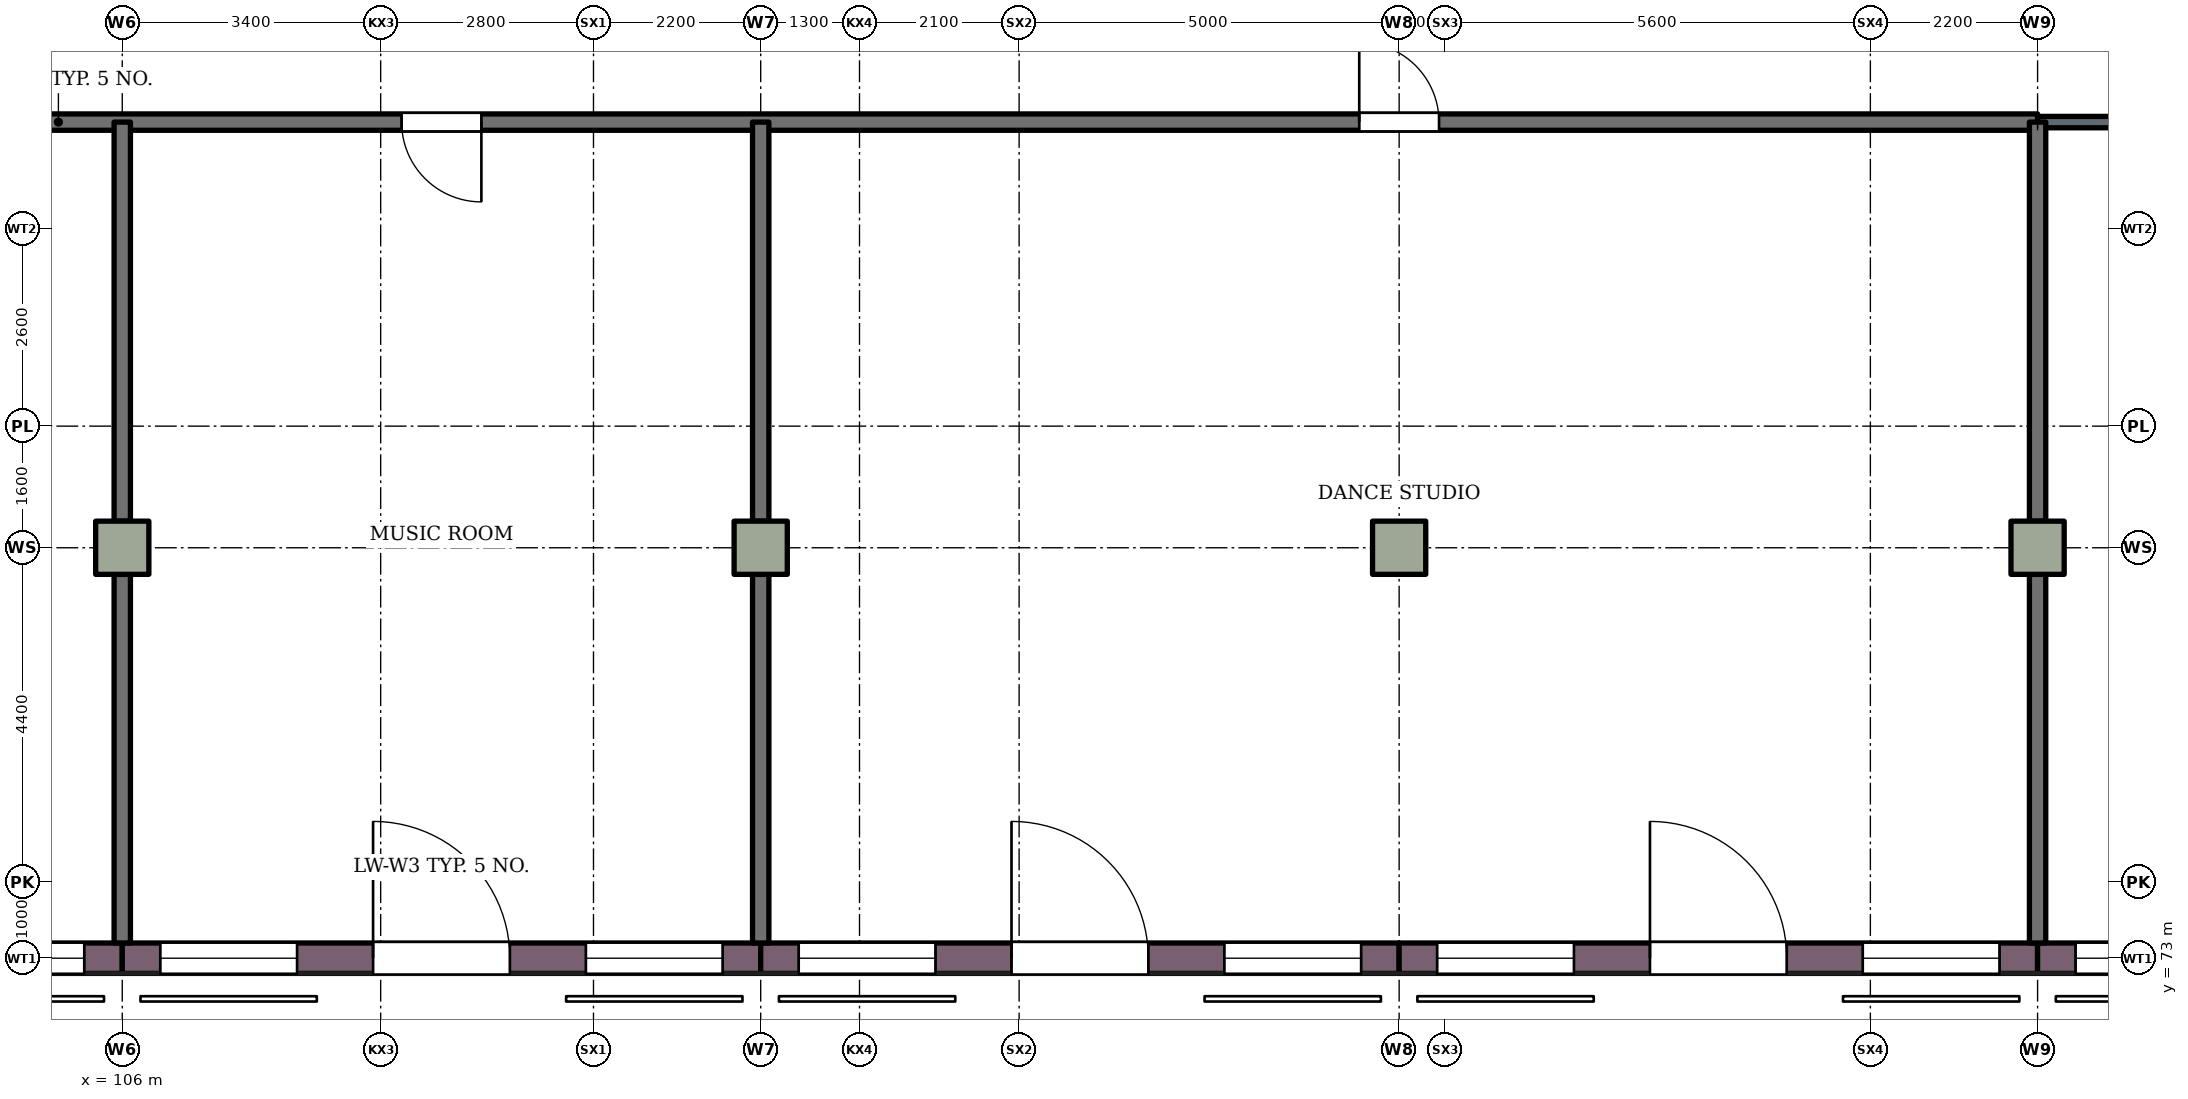
"""IFC4 building model, lengths in metres.
Left out: names, types, materials, properties, quantities, classifications, styles, units other than length and angle.
Written with IfcOpenShell. Run it as: python <this file> out.ifc"""

import sys

from ifc_helpers import new_model, si_unit, direction, frame, frame_2d, origin, origin_2d, place, context, subcontext, project, spatial, rectangle, extrude, element, fill, save


model = new_model("IFC4")
c1 = context("Model", 3, precision=1e-05, world=origin(), true_north=direction((0.0, 1.0)))
c2 = subcontext(c1, "Body", "Model", "MODEL_VIEW")
j1 = project(units=[si_unit("LENGTHUNIT", "METRE"), si_unit("PLANEANGLEUNIT", "RADIAN")], contexts=[c1])
p1 = place(None, origin())
s1 = spatial("IfcSite", under=j1, at=p1, CompositionType="ELEMENT")
p2 = place(p1, origin())
s2 = spatial("IfcBuilding", under=s1, at=p2, CompositionType="ELEMENT")
p3 = place(p2, frame((0.0, 0.0, 4.2)))
s3 = spatial("IfcBuildingStorey", under=s2, at=p3, CompositionType="ELEMENT", Elevation=4.2)
for number, where, z_axis, x_axis in (
    (1, (106.0, 78.4, 0.0), (0.0, 0.0, 1.0), (1.0, 0.0, 0.0)),
    (2, (114.4, 78.4, 0.0), (0.0, 0.0, 1.0), (1.0, 0.0, 0.0)),
    (3, (122.8, 78.4, 0.0), (0.0, 0.0, 1.0), (1.0, 0.0, 0.0)),
    (4, (131.2, 78.4, 0.0), (0.0, 0.0, 1.0), (1.0, 0.0, 0.0)),
):
    element("IfcColumn", number, at=place(p3, frame(where, z_axis=z_axis, x_axis=x_axis)), inside=s3, PredefinedType="COLUMN", context=c2, shape_type="SweptSolid", body=[
        extrude(rectangle(XDim=0.7, YDim=0.7, at=origin_2d()), origin(), (0.0, 0.0, 1.0), 4.2),
    ])
p4 = place(p3, frame((97.6, 73.0, 0.0), z_axis=(0.0, 0.0, 1.0), x_axis=(1.0, 0.0, 0.0)))
e5 = element("IfcWall", 5, at=p4, inside=s3, PredefinedType="SOLIDWALL", context=c2, shape_type="SweptSolid", body=[
    extrude(rectangle(XDim=8.4, YDim=0.4, at=frame_2d((4.2, 0.0))), origin(), (0.0, 0.0, 1.0), 3.32),
])
p5 = place(p4, frame((3.3, 0.0, 0.0)))
e6 = element("IfcOpeningElement", 6, at=p5, cuts=e5, PredefinedType="OPENING", context=c2, shape_type="SweptSolid", body=[
    extrude(rectangle(XDim=1.8, YDim=2.4, at=frame_2d((0.9, 1.2))), frame((0.0, 0.21, 0.0), z_axis=(0.0, -1.0, 0.0), x_axis=(1.0, 0.0, 0.0)), (0.0, 0.0, 1.0), 0.42),
])
p6 = place(p4, frame((0.5, 0.0, 0.9)))
e7 = element("IfcOpeningElement", 7, at=p6, cuts=e5, PredefinedType="OPENING", context=c2, shape_type="SweptSolid", body=[
    extrude(rectangle(XDim=1.8, YDim=1.9, at=frame_2d((0.9, 0.95))), frame((0.0, 0.21, 0.0), z_axis=(0.0, -1.0, 0.0), x_axis=(1.0, 0.0, 0.0)), (0.0, 0.0, 1.0), 0.42),
])
p7 = place(p4, frame((6.1, 0.0, 0.9)))
e8 = element("IfcOpeningElement", 8, at=p7, cuts=e5, PredefinedType="OPENING", context=c2, shape_type="SweptSolid", body=[
    extrude(rectangle(XDim=1.8, YDim=1.9, at=frame_2d((0.9, 0.95))), frame((0.0, 0.21, 0.0), z_axis=(0.0, -1.0, 0.0), x_axis=(1.0, 0.0, 0.0)), (0.0, 0.0, 1.0), 0.42),
])
p8 = place(p3, frame((106.0, 73.0, 0.0), z_axis=(0.0, 0.0, 1.0), x_axis=(1.0, 0.0, 0.0)))
e9 = element("IfcWall", 9, at=p8, inside=s3, PredefinedType="SOLIDWALL", context=c2, shape_type="SweptSolid", body=[
    extrude(rectangle(XDim=8.4, YDim=0.4, at=frame_2d((4.2, 0.0))), origin(), (0.0, 0.0, 1.0), 3.32),
])
p9 = place(p8, frame((3.3, 0.0, 0.0)))
e10 = element("IfcOpeningElement", 10, at=p9, cuts=e9, PredefinedType="OPENING", context=c2, shape_type="SweptSolid", body=[
    extrude(rectangle(XDim=1.8, YDim=2.4, at=frame_2d((0.9, 1.2))), frame((0.0, 0.21, 0.0), z_axis=(0.0, -1.0, 0.0), x_axis=(1.0, 0.0, 0.0)), (0.0, 0.0, 1.0), 0.42),
])
p10 = place(p8, frame((0.5, 0.0, 0.9)))
e11 = element("IfcOpeningElement", 11, at=p10, cuts=e9, PredefinedType="OPENING", context=c2, shape_type="SweptSolid", body=[
    extrude(rectangle(XDim=1.8, YDim=1.9, at=frame_2d((0.9, 0.95))), frame((0.0, 0.21, 0.0), z_axis=(0.0, -1.0, 0.0), x_axis=(1.0, 0.0, 0.0)), (0.0, 0.0, 1.0), 0.42),
])
p11 = place(p8, frame((6.1, 0.0, 0.9)))
e12 = element("IfcOpeningElement", 12, at=p11, cuts=e9, PredefinedType="OPENING", context=c2, shape_type="SweptSolid", body=[
    extrude(rectangle(XDim=1.8, YDim=1.9, at=frame_2d((0.9, 0.95))), frame((0.0, 0.21, 0.0), z_axis=(0.0, -1.0, 0.0), x_axis=(1.0, 0.0, 0.0)), (0.0, 0.0, 1.0), 0.42),
])
p12 = place(p3, frame((114.4, 73.0, 0.0), z_axis=(0.0, 0.0, 1.0), x_axis=(1.0, 0.0, 0.0)))
e13 = element("IfcWall", 13, at=p12, inside=s3, PredefinedType="SOLIDWALL", context=c2, shape_type="SweptSolid", body=[
    extrude(rectangle(XDim=8.4, YDim=0.4, at=frame_2d((4.2, 0.0))), origin(), (0.0, 0.0, 1.0), 3.32),
])
p13 = place(p12, frame((3.3, 0.0, 0.0)))
e14 = element("IfcOpeningElement", 14, at=p13, cuts=e13, PredefinedType="OPENING", context=c2, shape_type="SweptSolid", body=[
    extrude(rectangle(XDim=1.8, YDim=2.4, at=frame_2d((0.9, 1.2))), frame((0.0, 0.21, 0.0), z_axis=(0.0, -1.0, 0.0), x_axis=(1.0, 0.0, 0.0)), (0.0, 0.0, 1.0), 0.42),
])
p14 = place(p12, frame((0.5, 0.0, 0.9)))
e15 = element("IfcOpeningElement", 15, at=p14, cuts=e13, PredefinedType="OPENING", context=c2, shape_type="SweptSolid", body=[
    extrude(rectangle(XDim=1.8, YDim=1.9, at=frame_2d((0.9, 0.95))), frame((0.0, 0.21, 0.0), z_axis=(0.0, -1.0, 0.0), x_axis=(1.0, 0.0, 0.0)), (0.0, 0.0, 1.0), 0.42),
])
p15 = place(p12, frame((6.1, 0.0, 0.9)))
e16 = element("IfcOpeningElement", 16, at=p15, cuts=e13, PredefinedType="OPENING", context=c2, shape_type="SweptSolid", body=[
    extrude(rectangle(XDim=1.8, YDim=1.9, at=frame_2d((0.9, 0.95))), frame((0.0, 0.21, 0.0), z_axis=(0.0, -1.0, 0.0), x_axis=(1.0, 0.0, 0.0)), (0.0, 0.0, 1.0), 0.42),
])
p16 = place(p3, frame((122.8, 73.0, 0.0), z_axis=(0.0, 0.0, 1.0), x_axis=(1.0, 0.0, 0.0)))
e17 = element("IfcWall", 17, at=p16, inside=s3, PredefinedType="SOLIDWALL", context=c2, shape_type="SweptSolid", body=[
    extrude(rectangle(XDim=8.4, YDim=0.4, at=frame_2d((4.2, 0.0))), origin(), (0.0, 0.0, 1.0), 3.32),
])
p17 = place(p16, frame((3.3, 0.0, 0.0)))
e18 = element("IfcOpeningElement", 18, at=p17, cuts=e17, PredefinedType="OPENING", context=c2, shape_type="SweptSolid", body=[
    extrude(rectangle(XDim=1.8, YDim=2.4, at=frame_2d((0.9, 1.2))), frame((0.0, 0.21, 0.0), z_axis=(0.0, -1.0, 0.0), x_axis=(1.0, 0.0, 0.0)), (0.0, 0.0, 1.0), 0.42),
])
p18 = place(p16, frame((0.5, 0.0, 0.9)))
e19 = element("IfcOpeningElement", 19, at=p18, cuts=e17, PredefinedType="OPENING", context=c2, shape_type="SweptSolid", body=[
    extrude(rectangle(XDim=1.8, YDim=1.9, at=frame_2d((0.9, 0.95))), frame((0.0, 0.21, 0.0), z_axis=(0.0, -1.0, 0.0), x_axis=(1.0, 0.0, 0.0)), (0.0, 0.0, 1.0), 0.42),
])
p19 = place(p16, frame((6.1, 0.0, 0.9)))
e20 = element("IfcOpeningElement", 20, at=p19, cuts=e17, PredefinedType="OPENING", context=c2, shape_type="SweptSolid", body=[
    extrude(rectangle(XDim=1.8, YDim=1.9, at=frame_2d((0.9, 0.95))), frame((0.0, 0.21, 0.0), z_axis=(0.0, -1.0, 0.0), x_axis=(1.0, 0.0, 0.0)), (0.0, 0.0, 1.0), 0.42),
])
p20 = place(p3, frame((131.2, 73.0, 0.0), z_axis=(0.0, 0.0, 1.0), x_axis=(1.0, 0.0, 0.0)))
e21 = element("IfcWall", 21, at=p20, inside=s3, PredefinedType="SOLIDWALL", context=c2, shape_type="SweptSolid", body=[
    extrude(rectangle(XDim=8.215, YDim=0.4, at=frame_2d((4.107, 0.0))), origin(), (0.0, 0.0, 1.0), 3.32),
])
p21 = place(p20, frame((3.3, 0.0, 0.0)))
e22 = element("IfcOpeningElement", 22, at=p21, cuts=e21, PredefinedType="OPENING", context=c2, shape_type="SweptSolid", body=[
    extrude(rectangle(XDim=1.8, YDim=2.4, at=frame_2d((0.9, 1.2))), frame((0.0, 0.21, 0.0), z_axis=(0.0, -1.0, 0.0), x_axis=(1.0, 0.0, 0.0)), (0.0, 0.0, 1.0), 0.42),
])
p22 = place(p20, frame((0.5, 0.0, 0.9)))
e23 = element("IfcOpeningElement", 23, at=p22, cuts=e21, PredefinedType="OPENING", context=c2, shape_type="SweptSolid", body=[
    extrude(rectangle(XDim=1.8, YDim=1.9, at=frame_2d((0.9, 0.95))), frame((0.0, 0.21, 0.0), z_axis=(0.0, -1.0, 0.0), x_axis=(1.0, 0.0, 0.0)), (0.0, 0.0, 1.0), 0.42),
])
p23 = place(p20, frame((6.1, 0.0, 0.9)))
e24 = element("IfcOpeningElement", 24, at=p23, cuts=e21, PredefinedType="OPENING", context=c2, shape_type="SweptSolid", body=[
    extrude(rectangle(XDim=1.8, YDim=1.9, at=frame_2d((0.9, 0.95))), frame((0.0, 0.21, 0.0), z_axis=(0.0, -1.0, 0.0), x_axis=(1.0, 0.0, 0.0)), (0.0, 0.0, 1.0), 0.42),
])
p24 = place(p3, frame((89.2, 84.0, 0.0), z_axis=(0.0, 0.0, 1.0), x_axis=(1.0, 0.0, 0.0)))
e25 = element("IfcWall", 25, at=p24, inside=s3, PredefinedType="PARTITIONING", context=c2, shape_type="SweptSolid", body=[
    extrude(rectangle(XDim=42.0, YDim=0.215, at=frame_2d((21.0, 0.0))), origin(), (0.0, 0.0, 1.0), 3.92),
])
p25 = place(p24, frame((7.7, 0.0, 0.0)))
e26 = element("IfcOpeningElement", 26, at=p25, cuts=e25, PredefinedType="OPENING", context=c2, shape_type="SweptSolid", body=[
    extrude(rectangle(XDim=1.4, YDim=2.1, at=frame_2d((0.7, 1.05))), frame((0.0, 0.117, 0.0), z_axis=(0.0, -1.0, 0.0), x_axis=(1.0, 0.0, 0.0)), (0.0, 0.0, 1.0), 0.235),
])
p26 = place(p24, frame((20.475, 0.0, 0.0)))
e27 = element("IfcOpeningElement", 27, at=p26, cuts=e25, PredefinedType="OPENING", context=c2, shape_type="SweptSolid", body=[
    extrude(rectangle(XDim=1.05, YDim=2.1, at=frame_2d((0.525, 1.05))), frame((0.0, 0.117, 0.0), z_axis=(0.0, -1.0, 0.0), x_axis=(1.0, 0.0, 0.0)), (0.0, 0.0, 1.0), 0.235),
])
p27 = place(p24, frame((33.075, 0.0, 0.0)))
e28 = element("IfcOpeningElement", 28, at=p27, cuts=e25, PredefinedType="OPENING", context=c2, shape_type="SweptSolid", body=[
    extrude(rectangle(XDim=1.05, YDim=2.1, at=frame_2d((0.525, 1.05))), frame((0.0, 0.117, 0.0), z_axis=(0.0, -1.0, 0.0), x_axis=(1.0, 0.0, 0.0)), (0.0, 0.0, 1.0), 0.235),
])
p28 = place(p3, frame((131.2, 84.0, 0.0), z_axis=(0.0, 0.0, 1.0), x_axis=(1.0, 0.0, 0.0)))
e29 = element("IfcWall", 29, at=p28, inside=s3, PredefinedType="PARTITIONING", context=c2, shape_type="SweptSolid", body=[
    extrude(rectangle(XDim=8.05, YDim=0.15, at=frame_2d((4.025, 0.0))), origin(), (0.0, 0.0, 1.0), 3.92),
])
p29 = place(p28, frame((3.675, 0.0, 0.0)))
e30 = element("IfcOpeningElement", 30, at=p29, cuts=e29, PredefinedType="OPENING", context=c2, shape_type="SweptSolid", body=[
    extrude(rectangle(XDim=1.05, YDim=2.1, at=frame_2d((0.525, 1.05))), frame((0.0, 0.085, 0.0), z_axis=(0.0, -1.0, 0.0), x_axis=(1.0, 0.0, 0.0)), (0.0, 0.0, 1.0), 0.17),
])
p30 = place(p3, frame((106.0, 73.2, 0.0), z_axis=(0.0, 0.0, 1.0), x_axis=(0.0, 1.0, 0.0)))
e31 = element("IfcWall", 31, at=p30, inside=s3, PredefinedType="PARTITIONING", context=c2, shape_type="SweptSolid", body=[
    extrude(rectangle(XDim=4.85, YDim=0.215, at=frame_2d((2.425, 0.0))), origin(), (0.0, 0.0, 1.0), 3.02),
])
p31 = place(p3, frame((106.0, 78.75, 0.0), z_axis=(0.0, 0.0, 1.0), x_axis=(0.0, 1.0, 0.0)))
e32 = element("IfcWall", 32, at=p31, inside=s3, PredefinedType="PARTITIONING", context=c2, shape_type="SweptSolid", body=[
    extrude(rectangle(XDim=5.25, YDim=0.215, at=frame_2d((2.625, 0.0))), origin(), (0.0, 0.0, 1.0), 3.02),
])
p32 = place(p3, frame((114.4, 73.2, 0.0), z_axis=(0.0, 0.0, 1.0), x_axis=(0.0, 1.0, 0.0)))
e33 = element("IfcWall", 33, at=p32, inside=s3, PredefinedType="PARTITIONING", context=c2, shape_type="SweptSolid", body=[
    extrude(rectangle(XDim=4.85, YDim=0.215, at=frame_2d((2.425, 0.0))), origin(), (0.0, 0.0, 1.0), 3.02),
])
p33 = place(p3, frame((114.4, 78.75, 0.0), z_axis=(0.0, 0.0, 1.0), x_axis=(0.0, 1.0, 0.0)))
e34 = element("IfcWall", 34, at=p33, inside=s3, PredefinedType="PARTITIONING", context=c2, shape_type="SweptSolid", body=[
    extrude(rectangle(XDim=5.25, YDim=0.215, at=frame_2d((2.625, 0.0))), origin(), (0.0, 0.0, 1.0), 3.02),
])
p34 = place(p3, frame((131.2, 73.2, 0.0), z_axis=(0.0, 0.0, 1.0), x_axis=(0.0, 1.0, 0.0)))
e35 = element("IfcWall", 35, at=p34, inside=s3, PredefinedType="PARTITIONING", context=c2, shape_type="SweptSolid", body=[
    extrude(rectangle(XDim=4.85, YDim=0.215, at=frame_2d((2.425, 0.0))), origin(), (0.0, 0.0, 1.0), 3.02),
])
p35 = place(p3, frame((131.2, 78.75, 0.0), z_axis=(0.0, 0.0, 1.0), x_axis=(0.0, 1.0, 0.0)))
e36 = element("IfcWall", 36, at=p35, inside=s3, PredefinedType="PARTITIONING", context=c2, shape_type="SweptSolid", body=[
    extrude(rectangle(XDim=5.25, YDim=0.215, at=frame_2d((2.625, 0.0))), origin(), (0.0, 0.0, 1.0), 3.02),
])
p36 = place(p7, origin())
e37 = element("IfcWindow", 37, at=p36, inside=s3, PartitioningType="SINGLE_PANEL", PredefinedType="WINDOW", context=c2, shape_type="SweptSolid", body=[
    extrude(rectangle(XDim=1.8, YDim=1.9, at=frame_2d((0.9, 0.95))), frame((0.0, 0.03, 0.0), z_axis=(0.0, -1.0, 0.0), x_axis=(1.0, 0.0, 0.0)), (0.0, 0.0, 1.0), 0.06),
])
fill(e8, e37)
p37 = place(p9, origin())
e38 = element("IfcDoor", 38, at=p37, inside=s3, OperationType="DOUBLE_DOOR_SINGLE_SWING", PredefinedType="DOOR", context=c2, shape_type="SweptSolid", body=[
    extrude(rectangle(XDim=1.8, YDim=2.4, at=frame_2d((0.9, 1.2))), frame((0.0, 0.025, 0.0), z_axis=(0.0, -1.0, 0.0), x_axis=(1.0, 0.0, 0.0)), (0.0, 0.0, 1.0), 0.05),
])
fill(e10, e38)
p38 = place(p10, origin())
e39 = element("IfcWindow", 39, at=p38, inside=s3, PartitioningType="SINGLE_PANEL", PredefinedType="WINDOW", context=c2, shape_type="SweptSolid", body=[
    extrude(rectangle(XDim=1.8, YDim=1.9, at=frame_2d((0.9, 0.95))), frame((0.0, 0.03, 0.0), z_axis=(0.0, -1.0, 0.0), x_axis=(1.0, 0.0, 0.0)), (0.0, 0.0, 1.0), 0.06),
])
fill(e11, e39)
p39 = place(p11, origin())
e40 = element("IfcWindow", 40, at=p39, inside=s3, PartitioningType="SINGLE_PANEL", PredefinedType="WINDOW", context=c2, shape_type="SweptSolid", body=[
    extrude(rectangle(XDim=1.8, YDim=1.9, at=frame_2d((0.9, 0.95))), frame((0.0, 0.03, 0.0), z_axis=(0.0, -1.0, 0.0), x_axis=(1.0, 0.0, 0.0)), (0.0, 0.0, 1.0), 0.06),
])
fill(e12, e40)
p40 = place(p13, origin())
e41 = element("IfcDoor", 41, at=p40, inside=s3, OperationType="DOUBLE_DOOR_SINGLE_SWING", PredefinedType="DOOR", context=c2, shape_type="SweptSolid", body=[
    extrude(rectangle(XDim=1.8, YDim=2.4, at=frame_2d((0.9, 1.2))), frame((0.0, 0.025, 0.0), z_axis=(0.0, -1.0, 0.0), x_axis=(1.0, 0.0, 0.0)), (0.0, 0.0, 1.0), 0.05),
])
fill(e14, e41)
p41 = place(p14, origin())
e42 = element("IfcWindow", 42, at=p41, inside=s3, PartitioningType="SINGLE_PANEL", PredefinedType="WINDOW", context=c2, shape_type="SweptSolid", body=[
    extrude(rectangle(XDim=1.8, YDim=1.9, at=frame_2d((0.9, 0.95))), frame((0.0, 0.03, 0.0), z_axis=(0.0, -1.0, 0.0), x_axis=(1.0, 0.0, 0.0)), (0.0, 0.0, 1.0), 0.06),
])
fill(e15, e42)
p42 = place(p15, origin())
e43 = element("IfcWindow", 43, at=p42, inside=s3, PartitioningType="SINGLE_PANEL", PredefinedType="WINDOW", context=c2, shape_type="SweptSolid", body=[
    extrude(rectangle(XDim=1.8, YDim=1.9, at=frame_2d((0.9, 0.95))), frame((0.0, 0.03, 0.0), z_axis=(0.0, -1.0, 0.0), x_axis=(1.0, 0.0, 0.0)), (0.0, 0.0, 1.0), 0.06),
])
fill(e16, e43)
p43 = place(p17, origin())
e44 = element("IfcDoor", 44, at=p43, inside=s3, OperationType="DOUBLE_DOOR_SINGLE_SWING", PredefinedType="DOOR", context=c2, shape_type="SweptSolid", body=[
    extrude(rectangle(XDim=1.8, YDim=2.4, at=frame_2d((0.9, 1.2))), frame((0.0, 0.025, 0.0), z_axis=(0.0, -1.0, 0.0), x_axis=(1.0, 0.0, 0.0)), (0.0, 0.0, 1.0), 0.05),
])
fill(e18, e44)
p44 = place(p18, origin())
e45 = element("IfcWindow", 45, at=p44, inside=s3, PartitioningType="SINGLE_PANEL", PredefinedType="WINDOW", context=c2, shape_type="SweptSolid", body=[
    extrude(rectangle(XDim=1.8, YDim=1.9, at=frame_2d((0.9, 0.95))), frame((0.0, 0.03, 0.0), z_axis=(0.0, -1.0, 0.0), x_axis=(1.0, 0.0, 0.0)), (0.0, 0.0, 1.0), 0.06),
])
fill(e19, e45)
p45 = place(p19, origin())
e46 = element("IfcWindow", 46, at=p45, inside=s3, PartitioningType="SINGLE_PANEL", PredefinedType="WINDOW", context=c2, shape_type="SweptSolid", body=[
    extrude(rectangle(XDim=1.8, YDim=1.9, at=frame_2d((0.9, 0.95))), frame((0.0, 0.03, 0.0), z_axis=(0.0, -1.0, 0.0), x_axis=(1.0, 0.0, 0.0)), (0.0, 0.0, 1.0), 0.06),
])
fill(e20, e46)
p46 = place(p22, origin())
e47 = element("IfcWindow", 47, at=p46, inside=s3, PartitioningType="SINGLE_PANEL", PredefinedType="WINDOW", context=c2, shape_type="SweptSolid", body=[
    extrude(rectangle(XDim=1.8, YDim=1.9, at=frame_2d((0.9, 0.95))), frame((0.0, 0.03, 0.0), z_axis=(0.0, -1.0, 0.0), x_axis=(1.0, 0.0, 0.0)), (0.0, 0.0, 1.0), 0.06),
])
fill(e23, e47)
p47 = place(p26, origin())
e48 = element("IfcDoor", 48, at=p47, inside=s3, OperationType="SINGLE_SWING_RIGHT", PredefinedType="DOOR", context=c2, shape_type="SweptSolid", body=[
    extrude(rectangle(XDim=1.05, YDim=2.1, at=frame_2d((0.525, 1.05))), frame((0.0, 0.025, 0.0), z_axis=(0.0, -1.0, 0.0), x_axis=(1.0, 0.0, 0.0)), (0.0, 0.0, 1.0), 0.05),
])
fill(e27, e48)
p48 = place(p27, origin())
e49 = element("IfcDoor", 49, at=p48, inside=s3, OperationType="SINGLE_SWING_LEFT", PredefinedType="DOOR", context=c2, shape_type="SweptSolid", body=[
    extrude(rectangle(XDim=1.05, YDim=2.1, at=frame_2d((0.525, 1.05))), frame((0.0, 0.025, 0.0), z_axis=(0.0, -1.0, 0.0), x_axis=(1.0, 0.0, 0.0)), (0.0, 0.0, 1.0), 0.05),
])
fill(e28, e49)
save(model, sys.argv[1])
